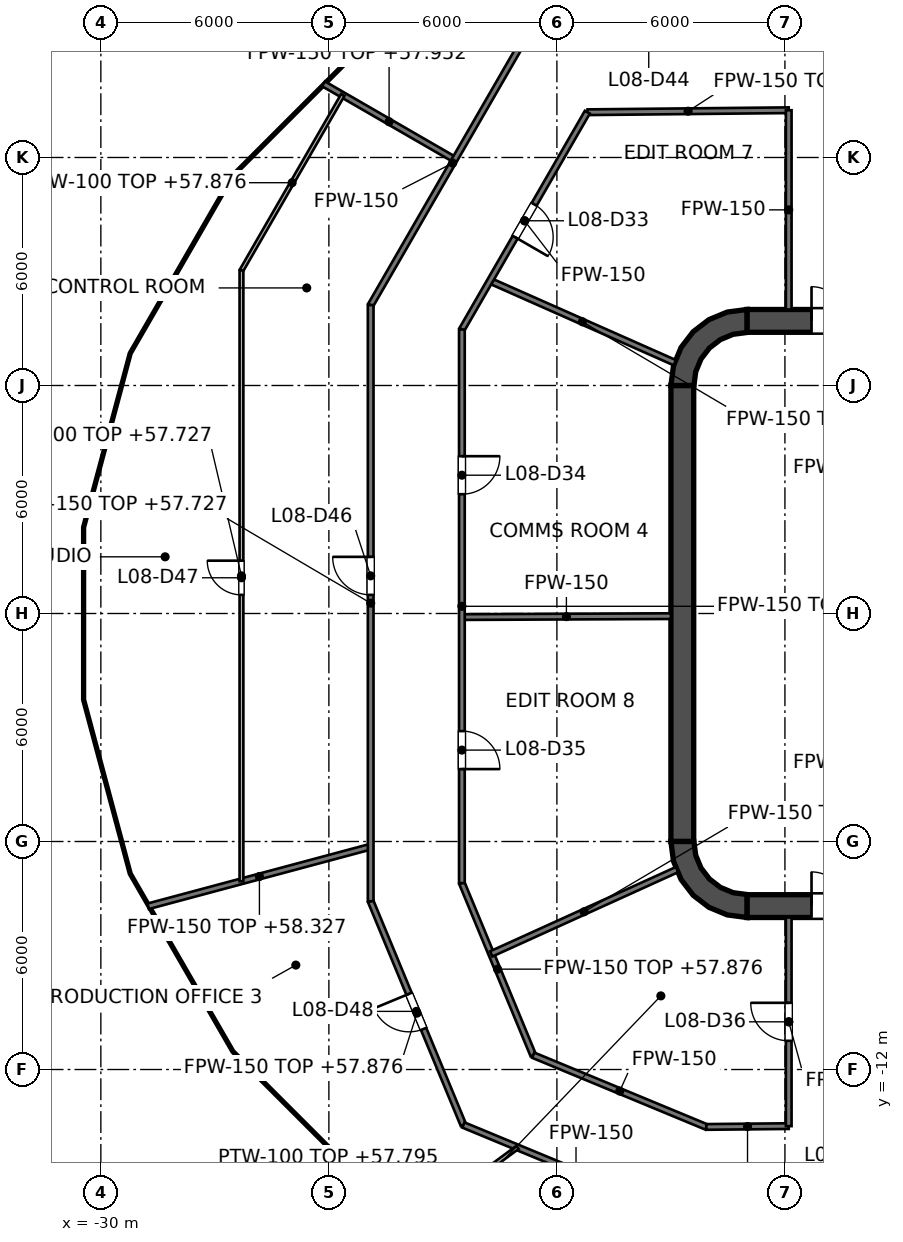
"""IFC4 building model, lengths in metres.
Left out: names, types, materials, properties, quantities, classifications, styles, units other than length and angle.
Written with IfcOpenShell. Run it as: python <this file> out.ifc"""

import sys

from ifc_helpers import new_model, si_unit, direction, frame, frame_2d, origin, place, context, subcontext, project, spatial, polyline, rectangle, outline, extrude, element, fill, save


model = new_model("IFC4")
c1 = context("Model", 3, precision=1e-05, world=origin(), true_north=direction((0.0, 1.0)))
c2 = subcontext(c1, "Body", "Model", "MODEL_VIEW")
j1 = project(units=[si_unit("LENGTHUNIT", "METRE"), si_unit("PLANEANGLEUNIT", "RADIAN")], contexts=[c1])
p1 = place(None, origin())
s1 = spatial("IfcSite", under=j1, at=p1, CompositionType="ELEMENT")
p2 = place(p1, origin())
s2 = spatial("IfcBuilding", under=s1, at=p2, CompositionType="ELEMENT")
p3 = place(p2, frame((0.0, 0.0, 54.6)))
s3 = spatial("IfcBuildingStorey", under=s2, at=p3, CompositionType="ELEMENT", Elevation=54.6)
p4 = place(p3, frame((-13.0, 7.7, 0.0), z_axis=(0.0, 0.0, 1.0), x_axis=(1.0, 0.0, 0.0)))
e1 = element("IfcWall", 1, at=p4, inside=s3, PredefinedType="SHEAR", context=c2, shape_type="SweptSolid", body=[
    extrude(rectangle(XDim=26.0, YDim=0.6, at=frame_2d((13.0, 0.0))), origin(), (0.0, 0.0, 1.0), 4.2),
])
p5 = place(p4, frame((1.7, 0.0, 0.0)))
e2 = element("IfcOpeningElement", 2, at=p5, cuts=e1, PredefinedType="OPENING", context=c2, shape_type="SweptSolid", body=[
    extrude(rectangle(XDim=1.8, YDim=2.1, at=frame_2d((0.9, 1.05))), frame((0.0, 0.3, 0.0), z_axis=(0.0, -1.0, 0.0), x_axis=(1.0, 0.0, 0.0)), (0.0, 0.0, 1.0), 0.6),
])
p6 = place(p4, frame((22.5, 0.0, 0.0)))
e3 = element("IfcOpeningElement", 3, at=p6, cuts=e1, PredefinedType="OPENING", context=c2, shape_type="SweptSolid", body=[
    extrude(rectangle(XDim=1.8, YDim=2.1, at=frame_2d((0.9, 1.05))), frame((0.0, 0.3, 0.0), z_axis=(0.0, -1.0, 0.0), x_axis=(1.0, 0.0, 0.0)), (0.0, 0.0, 1.0), 0.6),
])
p7 = place(p3, frame((-13.0, -7.7, 0.0), z_axis=(0.0, 0.0, 1.0), x_axis=(1.0, 0.0, 0.0)))
e4 = element("IfcWall", 4, at=p7, inside=s3, PredefinedType="SHEAR", context=c2, shape_type="SweptSolid", body=[
    extrude(rectangle(XDim=26.0, YDim=0.6, at=frame_2d((13.0, 0.0))), origin(), (0.0, 0.0, 1.0), 4.2),
])
p8 = place(p7, frame((1.7, 0.0, 0.0)))
e5 = element("IfcOpeningElement", 5, at=p8, cuts=e4, PredefinedType="OPENING", context=c2, shape_type="SweptSolid", body=[
    extrude(rectangle(XDim=1.8, YDim=2.1, at=frame_2d((0.9, 1.05))), frame((0.0, 0.3, 0.0), z_axis=(0.0, -1.0, 0.0), x_axis=(1.0, 0.0, 0.0)), (0.0, 0.0, 1.0), 0.6),
])
p9 = place(p7, frame((22.5, 0.0, 0.0)))
e6 = element("IfcOpeningElement", 6, at=p9, cuts=e4, PredefinedType="OPENING", context=c2, shape_type="SweptSolid", body=[
    extrude(rectangle(XDim=1.8, YDim=2.1, at=frame_2d((0.9, 1.05))), frame((0.0, 0.3, 0.0), z_axis=(0.0, -1.0, 0.0), x_axis=(1.0, 0.0, 0.0)), (0.0, 0.0, 1.0), 0.6),
])
p10 = place(p3, frame((-14.7, -6.0, 0.0), z_axis=(0.0, 0.0, 1.0), x_axis=(0.0, 1.0, 0.0)))
e7 = element("IfcWall", 7, at=p10, inside=s3, PredefinedType="SHEAR", context=c2, shape_type="SweptSolid", body=[
    extrude(rectangle(XDim=12.0, YDim=0.6, at=frame_2d((6.0, 0.0))), origin(), (0.0, 0.0, 1.0), 4.2),
])
p11 = place(p3, origin())
e8 = element("IfcWall", 8, at=p11, inside=s3, PredefinedType="SHEAR", context=c2, shape_type="SweptSolid", body=[
    extrude(outline(polyline([(-15.0, 6.0), (-14.395, 6.0), (-14.347, 6.361), (-14.208, 6.698), (-13.986, 6.986), (-13.698, 7.208), (-13.361, 7.347), (-13.0, 7.395), (-13.0, 8.0), (-13.518, 7.932), (-14.0, 7.732), (-14.414, 7.414), (-14.732, 7.0), (-14.932, 6.518), (-15.0, 6.0)])), origin(), (0.0, 0.0, 1.0), 4.2),
])
e9 = element("IfcWall", 9, at=p11, inside=s3, PredefinedType="SHEAR", context=c2, shape_type="SweptSolid", body=[
    extrude(outline(polyline([(-13.0, -8.0), (-13.0, -7.395), (-13.361, -7.347), (-13.698, -7.208), (-13.986, -6.986), (-14.208, -6.698), (-14.347, -6.361), (-14.395, -6.0), (-15.0, -6.0), (-14.932, -6.518), (-14.732, -7.0), (-14.414, -7.414), (-14.0, -7.732), (-13.518, -7.932), (-13.0, -8.0)])), origin(), (0.0, 0.0, 1.0), 4.2),
])
p12 = place(p3, frame((-11.8, -7.4, 0.0), z_axis=(0.0, 0.0, 1.0), x_axis=(0.0, 1.0, 0.0)))
e10 = element("IfcWall", 10, at=p12, inside=s3, PredefinedType="SOLIDWALL", context=c2, shape_type="SweptSolid", body=[
    extrude(rectangle(XDim=14.8, YDim=0.4, at=frame_2d((7.4, 0.0))), origin(), (0.0, 0.0, 1.0), 4.05),
])
p13 = place(p12, frame((11.2, 0.0, 0.0)))
e11 = element("IfcOpeningElement", 11, at=p13, cuts=e10, PredefinedType="OPENING", context=c2, shape_type="SweptSolid", body=[
    extrude(rectangle(XDim=1.1, YDim=2.1, at=frame_2d((0.55, 1.05))), frame((0.0, 0.2, 0.0), z_axis=(0.0, -1.0, 0.0), x_axis=(1.0, 0.0, 0.0)), (0.0, 0.0, 1.0), 0.4),
])
p14 = place(p12, frame((8.3, 0.0, 0.0)))
e12 = element("IfcOpeningElement", 12, at=p14, cuts=e10, PredefinedType="OPENING", context=c2, shape_type="SweptSolid", body=[
    extrude(rectangle(XDim=1.1, YDim=2.1, at=frame_2d((0.55, 1.05))), frame((0.0, 0.2, 0.0), z_axis=(0.0, -1.0, 0.0), x_axis=(1.0, 0.0, 0.0)), (0.0, 0.0, 1.0), 0.4),
])
p15 = place(p12, frame((5.4, 0.0, 0.0)))
e13 = element("IfcOpeningElement", 13, at=p15, cuts=e10, PredefinedType="OPENING", context=c2, shape_type="SweptSolid", body=[
    extrude(rectangle(XDim=1.1, YDim=2.1, at=frame_2d((0.55, 1.05))), frame((0.0, 0.2, 0.0), z_axis=(0.0, -1.0, 0.0), x_axis=(1.0, 0.0, 0.0)), (0.0, 0.0, 1.0), 0.4),
])
p16 = place(p12, frame((13.552, 0.0, 0.0)))
e14 = element("IfcOpeningElement", 14, at=p16, cuts=e10, PredefinedType="OPENING", context=c2, shape_type="SweptSolid", body=[
    extrude(rectangle(XDim=0.9, YDim=2.1, at=frame_2d((0.45, 1.05))), frame((0.0, 0.2, 0.0), z_axis=(0.0, -1.0, 0.0), x_axis=(1.0, 0.0, 0.0)), (0.0, 0.0, 1.0), 0.4),
])
p17 = place(p12, frame((0.347, 0.0, 0.0)))
e15 = element("IfcOpeningElement", 15, at=p17, cuts=e10, PredefinedType="OPENING", context=c2, shape_type="SweptSolid", body=[
    extrude(rectangle(XDim=0.9, YDim=2.1, at=frame_2d((0.45, 1.05))), frame((0.0, 0.2, 0.0), z_axis=(0.0, -1.0, 0.0), x_axis=(1.0, 0.0, 0.0)), (0.0, 0.0, 1.0), 0.4),
])
e16 = element("IfcWall", 16, at=p11, inside=s3, PredefinedType="SOLIDWALL", context=c2, shape_type="SweptSolid", body=[
    extrude(outline(polyline([(-12.0, -5.925), (-12.0, -5.675), (-14.15, -5.675), (-14.15, -3.025), (-12.0, -3.025), (-12.0, -2.775), (-14.15, -2.775), (-14.15, -0.125), (-12.0, -0.125), (-12.0, 0.125), (-14.15, 0.125), (-14.15, 2.775), (-12.0, 2.775), (-12.0, 3.025), (-14.15, 3.025), (-14.15, 5.675), (-12.0, 5.675), (-12.0, 5.925), (-14.15, 5.925), (-14.4, 5.925), (-14.4, 5.675), (-14.4, 3.025), (-14.4, 2.775), (-14.4, 0.125), (-14.4, -0.125), (-14.4, -2.775), (-14.4, -3.025), (-14.4, -5.675), (-14.4, -5.925), (-14.15, -5.925), (-12.0, -5.925)])), origin(), (0.0, 0.0, 1.0), 4.05),
])
p18 = place(p3, frame((-22.9, -7.572, 0.0), z_axis=(0.0, 0.0, 1.0), x_axis=(0.382860357704, -0.923806227788, 0.0)))
e17 = element("IfcWall", 17, at=p18, inside=s3, PredefinedType="PARTITIONING", context=c2, shape_type="SweptSolid", body=[
    extrude(rectangle(XDim=6.374, YDim=0.15, at=frame_2d((3.187, 0.0))), origin(), (0.0, 0.0, 1.0), 3.276),
])
p19 = place(p18, frame((2.637, 0.0, 0.0)))
e18 = element("IfcOpeningElement", 18, at=p19, cuts=e17, PredefinedType="OPENING", context=c2, shape_type="SweptSolid", body=[
    extrude(rectangle(XDim=1.0, YDim=2.1, at=frame_2d((0.5, 1.05))), frame((0.0, 0.075, 0.0), z_axis=(0.0, -1.0, 0.0), x_axis=(1.0, 0.0, 0.0)), (0.0, 0.0, 1.0), 0.15),
])
p20 = place(p3, frame((-20.5, -7.095, 0.0), z_axis=(0.0, 0.0, 1.0), x_axis=(0.382878184095, -0.923798839653, 0.0)))
e19 = element("IfcWall", 19, at=p20, inside=s3, PredefinedType="PARTITIONING", context=c2, shape_type="SweptSolid", body=[
    extrude(rectangle(XDim=4.902, YDim=0.15, at=frame_2d((2.451, 0.0))), origin(), (0.0, 0.0, 1.0), 3.276),
])
p21 = place(p3, frame((-24.141, 13.938, 0.0), z_axis=(0.0, 0.0, 1.0), x_axis=(0.865983578848, -0.500072435918, 0.0)))
e20 = element("IfcWall", 20, at=p21, inside=s3, PredefinedType="PARTITIONING", context=c2, shape_type="SweptSolid", body=[
    extrude(rectangle(XDim=3.985, YDim=0.15, at=frame_2d((1.993, 0.0))), origin(), (0.0, 0.0, 1.0), 3.352),
])
p22 = place(p3, frame((-19.76, 8.755, 0.0), z_axis=(0.0, 0.0, 1.0), x_axis=(0.91424834547, -0.405154245695, 0.0)))
e21 = element("IfcWall", 21, at=p22, inside=s3, PredefinedType="PARTITIONING", context=c2, shape_type="SweptSolid", body=[
    extrude(rectangle(XDim=5.318, YDim=0.15, at=frame_2d((2.659, 0.0))), origin(), (0.0, 0.0, 1.0), 3.276),
])
p23 = place(p3, frame((-20.46, -13.46, 0.0), z_axis=(0.0, 0.0, 1.0), x_axis=(0.9237825057, -0.382917591869, 0.0)))
e22 = element("IfcWall", 22, at=p23, inside=s3, PredefinedType="PARTITIONING", context=c2, shape_type="SweptSolid", body=[
    extrude(rectangle(XDim=6.415, YDim=0.15, at=frame_2d((3.208, 0.0))), origin(), (0.0, 0.0, 1.0), 3.195),
])
p24 = place(p3, frame((-18.623, -11.623, 0.0), z_axis=(0.0, 0.0, 1.0), x_axis=(0.923791670587, -0.38289548098, 0.0)))
e23 = element("IfcWall", 23, at=p24, inside=s3, PredefinedType="PARTITIONING", context=c2, shape_type="SweptSolid", body=[
    extrude(rectangle(XDim=4.931, YDim=0.15, at=frame_2d((2.465, 0.0))), origin(), (0.0, 0.0, 1.0), 3.195),
])
p25 = place(p3, frame((-20.5, -0.094, 0.0), z_axis=(0.0, 0.0, 1.0), x_axis=(0.999990148138, 0.004438876723, 0.0)))
e24 = element("IfcWall", 24, at=p25, inside=s3, PredefinedType="PARTITIONING", context=c2, shape_type="SweptSolid", body=[
    extrude(rectangle(XDim=5.5, YDim=0.15, at=frame_2d((2.75, 0.0))), origin(), (0.0, 0.0, 1.0), 3.195),
])
p26 = place(p3, frame((-14.068, -13.511, 0.0), z_axis=(0.0, 0.0, 1.0), x_axis=(0.999950911515, 0.009908307647, 0.0)))
e25 = element("IfcWall", 25, at=p26, inside=s3, PredefinedType="PARTITIONING", context=c2, shape_type="SweptSolid", body=[
    extrude(rectangle(XDim=2.168, YDim=0.15, at=frame_2d((1.084, 0.0))), origin(), (0.0, 0.0, 1.0), 3.276),
])
p27 = place(p3, frame((-17.194, 13.191, 0.0), z_axis=(0.0, 0.0, 1.0), x_axis=(0.999950853109, 0.009914200296, 0.0)))
e26 = element("IfcWall", 26, at=p27, inside=s3, PredefinedType="PARTITIONING", context=c2, shape_type="SweptSolid", body=[
    extrude(rectangle(XDim=5.294, YDim=0.15, at=frame_2d((2.647, 0.0))), origin(), (0.0, 0.0, 1.0), 3.276),
])
p28 = place(p3, frame((-28.755, -7.705, 0.0), z_axis=(0.0, 0.0, 1.0), x_axis=(0.965915328716, 0.2588582194, 0.0)))
e27 = element("IfcWall", 27, at=p28, inside=s3, PredefinedType="PARTITIONING", context=c2, shape_type="SweptSolid", body=[
    extrude(rectangle(XDim=6.062, YDim=0.15, at=frame_2d((3.031, 0.0))), origin(), (0.0, 0.0, 1.0), 3.727),
])
p29 = place(p3, frame((-19.728, -8.958, 0.0), z_axis=(0.0, 0.0, 1.0), x_axis=(0.910629511797, 0.413223779863, 0.0)))
e28 = element("IfcWall", 28, at=p29, inside=s3, PredefinedType="PARTITIONING", context=c2, shape_type="SweptSolid", body=[
    extrude(rectangle(XDim=5.368, YDim=0.15, at=frame_2d((2.684, 0.0))), origin(), (0.0, 0.0, 1.0), 4.05),
])
p30 = place(p3, frame((-20.5, 7.474, 0.0), z_axis=(0.0, 0.0, 1.0), x_axis=(0.500012665616, 0.866018091164, 0.0)))
e29 = element("IfcWall", 29, at=p30, inside=s3, PredefinedType="PARTITIONING", context=c2, shape_type="SweptSolid", body=[
    extrude(rectangle(XDim=6.602, YDim=0.15, at=frame_2d((3.301, 0.0))), origin(), (0.0, 0.0, 1.0), 3.195),
])
p31 = place(p30, frame((2.803, 0.0, 0.0)))
e30 = element("IfcOpeningElement", 30, at=p31, cuts=e29, PredefinedType="OPENING", context=c2, shape_type="SweptSolid", body=[
    extrude(rectangle(XDim=1.0, YDim=2.1, at=frame_2d((0.5, 1.05))), frame((0.0, 0.075, 0.0), z_axis=(0.0, -1.0, 0.0), x_axis=(1.0, 0.0, 0.0)), (0.0, 0.0, 1.0), 0.15),
])
p32 = place(p3, frame((-22.9, 8.117, 0.0), z_axis=(0.0, 0.0, 1.0), x_axis=(0.5000050195, 0.866022505755, 0.0)))
e31 = element("IfcWall", 31, at=p32, inside=s3, PredefinedType="PARTITIONING", context=c2, shape_type="SweptSolid", body=[
    extrude(rectangle(XDim=8.626, YDim=0.15, at=frame_2d((4.313, 0.0))), origin(), (0.0, 0.0, 1.0), 3.195),
])
p33 = place(p3, frame((-11.9, -13.49, 0.0), z_axis=(0.0, 0.0, 1.0), x_axis=(0.0, 1.0, 0.0)))
e32 = element("IfcWall", 32, at=p33, inside=s3, PredefinedType="PARTITIONING", context=c2, shape_type="SweptSolid", body=[
    extrude(rectangle(XDim=5.49, YDim=0.15, at=frame_2d((2.745, 0.0))), origin(), (0.0, 0.0, 1.0), 3.195),
])
p34 = place(p33, frame((2.245, 0.0, 0.0)))
e33 = element("IfcOpeningElement", 33, at=p34, cuts=e32, PredefinedType="OPENING", context=c2, shape_type="SweptSolid", body=[
    extrude(rectangle(XDim=1.0, YDim=2.1, at=frame_2d((0.5, 1.05))), frame((0.0, 0.075, 0.0), z_axis=(0.0, -1.0, 0.0), x_axis=(1.0, 0.0, 0.0)), (0.0, 0.0, 1.0), 0.15),
])
p35 = place(p3, frame((-11.9, 8.0, 0.0), z_axis=(0.0, 0.0, 1.0), x_axis=(0.0, 1.0, 0.0)))
e34 = element("IfcWall", 34, at=p35, inside=s3, PredefinedType="PARTITIONING", context=c2, shape_type="SweptSolid", body=[
    extrude(rectangle(XDim=5.243, YDim=0.15, at=frame_2d((2.622, 0.0))), origin(), (0.0, 0.0, 1.0), 3.195),
])
p36 = place(p3, frame((-20.5, -7.095, 0.0), z_axis=(0.0, 0.0, 1.0), x_axis=(0.0, 1.0, 0.0)))
e35 = element("IfcWall", 35, at=p36, inside=s3, PredefinedType="PARTITIONING", context=c2, shape_type="SweptSolid", body=[
    extrude(rectangle(XDim=14.569, YDim=0.15, at=frame_2d((7.285, 0.0))), origin(), (0.0, 0.0, 1.0), 3.127),
])
p37 = place(p36, frame((10.234, 0.0, 0.0)))
e36 = element("IfcOpeningElement", 36, at=p37, cuts=e35, PredefinedType="OPENING", context=c2, shape_type="SweptSolid", body=[
    extrude(rectangle(XDim=1.0, YDim=2.1, at=frame_2d((0.5, 1.05))), frame((0.0, 0.075, 0.0), z_axis=(0.0, -1.0, 0.0), x_axis=(1.0, 0.0, 0.0)), (0.0, 0.0, 1.0), 0.15),
])
p38 = place(p36, frame((3.0, 0.0, 0.0)))
e37 = element("IfcOpeningElement", 37, at=p38, cuts=e35, PredefinedType="OPENING", context=c2, shape_type="SweptSolid", body=[
    extrude(rectangle(XDim=1.0, YDim=2.1, at=frame_2d((0.5, 1.05))), frame((0.0, 0.075, 0.0), z_axis=(0.0, -1.0, 0.0), x_axis=(1.0, 0.0, 0.0)), (0.0, 0.0, 1.0), 0.15),
])
p39 = place(p3, frame((-22.9, -7.572, 0.0), z_axis=(0.0, 0.0, 1.0), x_axis=(0.0, 1.0, 0.0)))
e38 = element("IfcWall", 38, at=p39, inside=s3, PredefinedType="PARTITIONING", context=c2, shape_type="SweptSolid", body=[
    extrude(rectangle(XDim=15.689, YDim=0.15, at=frame_2d((7.844, 0.0))), origin(), (0.0, 0.0, 1.0), 3.127),
])
p40 = place(p39, frame((8.062, 0.0, 0.0)))
e39 = element("IfcOpeningElement", 39, at=p40, cuts=e38, PredefinedType="OPENING", context=c2, shape_type="SweptSolid", body=[
    extrude(rectangle(XDim=1.0, YDim=2.1, at=frame_2d((0.5, 1.05))), frame((0.0, 0.075, 0.0), z_axis=(0.0, -1.0, 0.0), x_axis=(1.0, 0.0, 0.0)), (0.0, 0.0, 1.0), 0.15),
])
p41 = place(p3, frame((-21.91, -16.17, 0.0), z_axis=(0.0, 0.0, 1.0), x_axis=(0.804644864384, 0.593756382888, 0.0)))
e40 = element("IfcWall", 40, at=p41, inside=s3, PredefinedType="PARTITIONING", context=c2, shape_type="SweptSolid", body=[
    extrude(rectangle(XDim=3.57, YDim=0.1, at=frame_2d((1.785, 0.0))), origin(), (0.0, 0.0, 1.0), 3.195),
])
p42 = place(p3, frame((-26.3, 9.028, 0.0), z_axis=(0.0, 0.0, 1.0), x_axis=(0.500059382915, 0.865991116328, 0.0)))
e41 = element("IfcWall", 41, at=p42, inside=s3, PredefinedType="PARTITIONING", context=c2, shape_type="SweptSolid", body=[
    extrude(rectangle(XDim=5.331, YDim=0.1, at=frame_2d((2.666, 0.0))), origin(), (0.0, 0.0, 1.0), 3.276),
])
p43 = place(p3, frame((-26.3, -7.047, 0.0), z_axis=(0.0, 0.0, 1.0), x_axis=(0.0, 1.0, 0.0)))
e42 = element("IfcWall", 42, at=p43, inside=s3, PredefinedType="PARTITIONING", context=c2, shape_type="SweptSolid", body=[
    extrude(rectangle(XDim=16.075, YDim=0.1, at=frame_2d((8.038, 0.0))), origin(), (0.0, 0.0, 1.0), 3.127),
])
p44 = place(p43, frame((7.537, 0.0, 0.0)))
e43 = element("IfcOpeningElement", 43, at=p44, cuts=e42, PredefinedType="OPENING", context=c2, shape_type="SweptSolid", body=[
    extrude(rectangle(XDim=0.9, YDim=2.1, at=frame_2d((0.45, 1.05))), frame((0.0, 0.05, 0.0), z_axis=(0.0, -1.0, 0.0), x_axis=(1.0, 0.0, 0.0)), (0.0, 0.0, 1.0), 0.1),
])
p45 = place(p13, origin())
e44 = element("IfcDoor", 44, at=p45, inside=s3, OperationType="DOUBLE_DOOR_SLIDING", PredefinedType="DOOR", context=c2, shape_type="SweptSolid", body=[
    extrude(rectangle(XDim=1.1, YDim=2.1, at=frame_2d((0.55, 1.05))), frame((0.0, 0.025, 0.0), z_axis=(0.0, -1.0, 0.0), x_axis=(1.0, 0.0, 0.0)), (0.0, 0.0, 1.0), 0.05),
])
fill(e11, e44)
p46 = place(p14, origin())
e45 = element("IfcDoor", 45, at=p46, inside=s3, OperationType="DOUBLE_DOOR_SLIDING", PredefinedType="DOOR", context=c2, shape_type="SweptSolid", body=[
    extrude(rectangle(XDim=1.1, YDim=2.1, at=frame_2d((0.55, 1.05))), frame((0.0, 0.025, 0.0), z_axis=(0.0, -1.0, 0.0), x_axis=(1.0, 0.0, 0.0)), (0.0, 0.0, 1.0), 0.05),
])
fill(e12, e45)
p47 = place(p15, origin())
e46 = element("IfcDoor", 46, at=p47, inside=s3, OperationType="DOUBLE_DOOR_SLIDING", PredefinedType="DOOR", context=c2, shape_type="SweptSolid", body=[
    extrude(rectangle(XDim=1.1, YDim=2.1, at=frame_2d((0.55, 1.05))), frame((0.0, 0.025, 0.0), z_axis=(0.0, -1.0, 0.0), x_axis=(1.0, 0.0, 0.0)), (0.0, 0.0, 1.0), 0.05),
])
fill(e13, e46)
p48 = place(p16, origin())
e47 = element("IfcDoor", 47, at=p48, inside=s3, OperationType="SINGLE_SWING_LEFT", PredefinedType="DOOR", context=c2, shape_type="SweptSolid", body=[
    extrude(rectangle(XDim=0.9, YDim=2.1, at=frame_2d((0.45, 1.05))), frame((0.0, 0.025, 0.0), z_axis=(0.0, -1.0, 0.0), x_axis=(1.0, 0.0, 0.0)), (0.0, 0.0, 1.0), 0.05),
])
fill(e14, e47)
p49 = place(p17, origin())
e48 = element("IfcDoor", 48, at=p49, inside=s3, OperationType="SINGLE_SWING_LEFT", PredefinedType="DOOR", context=c2, shape_type="SweptSolid", body=[
    extrude(rectangle(XDim=0.9, YDim=2.1, at=frame_2d((0.45, 1.05))), frame((0.0, 0.025, 0.0), z_axis=(0.0, -1.0, 0.0), x_axis=(1.0, 0.0, 0.0)), (0.0, 0.0, 1.0), 0.05),
])
fill(e15, e48)
p50 = place(p5, origin())
e49 = element("IfcDoor", 49, at=p50, inside=s3, OperationType="DOUBLE_DOOR_SINGLE_SWING", PredefinedType="DOOR", context=c2, shape_type="SweptSolid", body=[
    extrude(rectangle(XDim=1.8, YDim=2.1, at=frame_2d((0.9, 1.05))), frame((0.0, 0.025, 0.0), z_axis=(0.0, -1.0, 0.0), x_axis=(1.0, 0.0, 0.0)), (0.0, 0.0, 1.0), 0.05),
])
fill(e2, e49)
p51 = place(p8, origin())
e50 = element("IfcDoor", 50, at=p51, inside=s3, OperationType="DOUBLE_DOOR_SINGLE_SWING", PredefinedType="DOOR", context=c2, shape_type="SweptSolid", body=[
    extrude(rectangle(XDim=1.8, YDim=2.1, at=frame_2d((0.9, 1.05))), frame((0.0, 0.025, 0.0), z_axis=(0.0, -1.0, 0.0), x_axis=(1.0, 0.0, 0.0)), (0.0, 0.0, 1.0), 0.05),
])
fill(e5, e50)
p52 = place(p31, origin())
e51 = element("IfcDoor", 51, at=p52, inside=s3, OperationType="SINGLE_SWING_LEFT", PredefinedType="DOOR", context=c2, shape_type="SweptSolid", body=[
    extrude(rectangle(XDim=1.0, YDim=2.1, at=frame_2d((0.5, 1.05))), frame((0.0, 0.025, 0.0), z_axis=(0.0, -1.0, 0.0), x_axis=(1.0, 0.0, 0.0)), (0.0, 0.0, 1.0), 0.05),
])
fill(e30, e51)
p53 = place(p37, origin())
e52 = element("IfcDoor", 52, at=p53, inside=s3, OperationType="SINGLE_SWING_RIGHT", PredefinedType="DOOR", context=c2, shape_type="SweptSolid", body=[
    extrude(rectangle(XDim=1.0, YDim=2.1, at=frame_2d((0.5, 1.05))), frame((0.0, 0.025, 0.0), z_axis=(0.0, -1.0, 0.0), x_axis=(1.0, 0.0, 0.0)), (0.0, 0.0, 1.0), 0.05),
])
fill(e36, e52)
p54 = place(p38, origin())
e53 = element("IfcDoor", 53, at=p54, inside=s3, OperationType="SINGLE_SWING_LEFT", PredefinedType="DOOR", context=c2, shape_type="SweptSolid", body=[
    extrude(rectangle(XDim=1.0, YDim=2.1, at=frame_2d((0.5, 1.05))), frame((0.0, 0.025, 0.0), z_axis=(0.0, -1.0, 0.0), x_axis=(1.0, 0.0, 0.0)), (0.0, 0.0, 1.0), 0.05),
])
fill(e37, e53)
p55 = place(p34, origin())
e54 = element("IfcDoor", 54, at=p55, inside=s3, OperationType="SINGLE_SWING_RIGHT", PredefinedType="DOOR", context=c2, shape_type="SweptSolid", body=[
    extrude(rectangle(XDim=1.0, YDim=2.1, at=frame_2d((0.5, 1.05))), frame((0.0, 0.025, 0.0), z_axis=(0.0, -1.0, 0.0), x_axis=(1.0, 0.0, 0.0)), (0.0, 0.0, 1.0), 0.05),
])
fill(e33, e54)
p56 = place(p40, origin())
e55 = element("IfcDoor", 55, at=p56, inside=s3, OperationType="SINGLE_SWING_RIGHT", PredefinedType="DOOR", context=c2, shape_type="SweptSolid", body=[
    extrude(rectangle(XDim=1.0, YDim=2.1, at=frame_2d((0.5, 1.05))), frame((0.0, 0.025, 0.0), z_axis=(0.0, -1.0, 0.0), x_axis=(1.0, 0.0, 0.0)), (0.0, 0.0, 1.0), 0.05),
])
fill(e39, e55)
p57 = place(p44, origin())
e56 = element("IfcDoor", 56, at=p57, inside=s3, OperationType="SINGLE_SWING_RIGHT", PredefinedType="DOOR", context=c2, shape_type="SweptSolid", body=[
    extrude(rectangle(XDim=0.9, YDim=2.1, at=frame_2d((0.45, 1.05))), frame((0.0, 0.025, 0.0), z_axis=(0.0, -1.0, 0.0), x_axis=(1.0, 0.0, 0.0)), (0.0, 0.0, 1.0), 0.05),
])
fill(e43, e56)
p58 = place(p19, origin())
e57 = element("IfcDoor", 57, at=p58, inside=s3, OperationType="SINGLE_SWING_LEFT", PredefinedType="DOOR", context=c2, shape_type="SweptSolid", body=[
    extrude(rectangle(XDim=1.0, YDim=2.1, at=frame_2d((0.5, 1.05))), frame((0.0, 0.025, 0.0), z_axis=(0.0, -1.0, 0.0), x_axis=(1.0, 0.0, 0.0)), (0.0, 0.0, 1.0), 0.05),
])
fill(e18, e57)
save(model, sys.argv[1])
